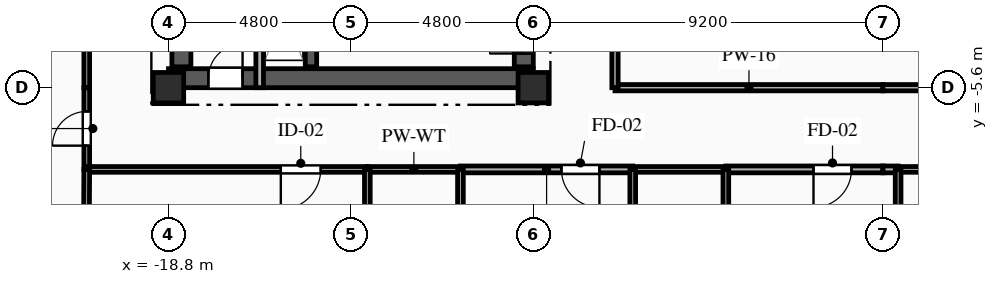
"""IFC4 building model, lengths in metres.
Left out: names, types, materials, properties, quantities, classifications, styles, units other than length and angle.
Written with IfcOpenShell. Run it as: python <this file> out.ifc"""

import sys

from ifc_helpers import new_model, si_unit, direction, frame, frame_2d, origin, origin_2d, place, context, subcontext, project, spatial, rectangle, extrude, element, fill, save


model = new_model("IFC4")
c1 = context("Model", 3, precision=1e-05, world=origin(), true_north=direction((0.0, 1.0)))
c2 = subcontext(c1, "Body", "Model", "MODEL_VIEW")
j1 = project(units=[si_unit("LENGTHUNIT", "METRE"), si_unit("PLANEANGLEUNIT", "RADIAN")], contexts=[c1])
p1 = place(None, origin())
s1 = spatial("IfcSite", under=j1, at=p1, CompositionType="ELEMENT")
p2 = place(p1, origin())
s2 = spatial("IfcBuilding", under=s1, at=p2, CompositionType="ELEMENT")
p3 = place(p2, frame((0.0, 0.0, 219.85)))
s3 = spatial("IfcBuildingStorey", under=s2, at=p3, CompositionType="ELEMENT", Elevation=219.85)
for number, where, z_axis, x_axis in (
    (1, (-18.8, -5.6, 0.0), (0.0, 0.0, 1.0), (1.0, 0.0, 0.0)),
    (2, (-9.2, -5.6, 0.0), (0.0, 0.0, 1.0), (1.0, 0.0, 0.0)),
):
    element("IfcColumn", number, at=place(p3, frame(where, z_axis=z_axis, x_axis=x_axis)), inside=s3, PredefinedType="COLUMN", context=c2, shape_type="SweptSolid", body=[
        extrude(rectangle(XDim=0.8, YDim=0.8, at=origin_2d()), origin(), (0.0, 0.0, 1.0), 3.35),
    ])
p4 = place(p3, frame((-18.8, -5.35, 0.0), z_axis=(0.0, 0.0, 1.0), x_axis=(1.0, 0.0, 0.0)))
e3 = element("IfcWall", 3, at=p4, inside=s3, PredefinedType="SHEAR", context=c2, shape_type="SweptSolid", body=[
    extrude(rectangle(XDim=9.6, YDim=0.5, at=frame_2d((4.8, 0.0))), origin(), (0.0, 0.0, 1.0), 3.0),
])
p5 = place(p4, frame((1.05, 0.0, 0.0)))
e4 = element("IfcOpeningElement", 4, at=p5, cuts=e3, PredefinedType="OPENING", context=c2, shape_type="SweptSolid", body=[
    extrude(rectangle(XDim=0.9, YDim=2.1, at=frame_2d((0.45, 1.05))), frame((0.0, 0.26, 0.0), z_axis=(0.0, -1.0, 0.0), x_axis=(1.0, 0.0, 0.0)), (0.0, 0.0, 1.0), 0.52),
])
p6 = place(p3, frame((-18.46, -5.05, 0.0), z_axis=(0.0, 0.0, 1.0), x_axis=(0.0, 1.0, 0.0)))
e5 = element("IfcWall", 5, at=p6, inside=s3, PredefinedType="SHEAR", context=c2, shape_type="SweptSolid", body=[
    extrude(rectangle(XDim=10.1, YDim=0.5, at=frame_2d((5.05, 0.0))), origin(), (0.0, 0.0, 1.0), 3.0),
])
p7 = place(p3, frame((-9.45, -5.05, 0.0), z_axis=(0.0, 0.0, 1.0), x_axis=(0.0, 1.0, 0.0)))
e6 = element("IfcWall", 6, at=p7, inside=s3, PredefinedType="SHEAR", context=c2, shape_type="SweptSolid", body=[
    extrude(rectangle(XDim=10.1, YDim=0.5, at=frame_2d((5.05, 0.0))), origin(), (0.0, 0.0, 1.0), 3.0),
])
p8 = place(p7, frame((7.15, 0.0, 0.0)))
e7 = element("IfcOpeningElement", 7, at=p8, cuts=e6, PredefinedType="OPENING", context=c2, shape_type="SweptSolid", body=[
    extrude(rectangle(XDim=0.9, YDim=2.1, at=frame_2d((0.45, 1.05))), frame((0.0, 0.26, 0.0), z_axis=(0.0, -1.0, 0.0), x_axis=(1.0, 0.0, 0.0)), (0.0, 0.0, 1.0), 0.52),
])
p9 = place(p7, frame((2.4, 0.0, 0.0)))
e8 = element("IfcOpeningElement", 8, at=p9, cuts=e6, PredefinedType="OPENING", context=c2, shape_type="SweptSolid", body=[
    extrude(rectangle(XDim=1.2, YDim=2.15, at=frame_2d((0.6, 1.075))), frame((0.0, 0.26, 0.0), z_axis=(0.0, -1.0, 0.0), x_axis=(1.0, 0.0, 0.0)), (0.0, 0.0, 1.0), 0.52),
])
p10 = place(p7, frame((0.35, 0.0, 0.0)))
e9 = element("IfcOpeningElement", 9, at=p10, cuts=e6, PredefinedType="OPENING", context=c2, shape_type="SweptSolid", body=[
    extrude(rectangle(XDim=0.9, YDim=2.1, at=frame_2d((0.45, 1.05))), frame((0.0, 0.26, 0.0), z_axis=(0.0, -1.0, 0.0), x_axis=(1.0, 0.0, 0.0)), (0.0, 0.0, 1.0), 0.52),
])
p11 = place(p7, frame((5.0, 0.0, 0.0)))
e10 = element("IfcOpeningElement", 10, at=p11, cuts=e6, PredefinedType="OPENING", context=c2, shape_type="SweptSolid", body=[
    extrude(rectangle(XDim=0.9, YDim=2.1, at=frame_2d((0.45, 1.05))), frame((0.0, 0.26, 0.0), z_axis=(0.0, -1.0, 0.0), x_axis=(1.0, 0.0, 0.0)), (0.0, 0.0, 1.0), 0.52),
])
p12 = place(p3, frame((-15.05, -5.05, 0.0), z_axis=(0.0, 0.0, 1.0), x_axis=(0.0, 1.0, 0.0)))
e11 = element("IfcWall", 11, at=p12, inside=s3, PredefinedType="SHEAR", context=c2, shape_type="SweptSolid", body=[
    extrude(rectangle(XDim=10.1, YDim=0.3, at=frame_2d((5.05, 0.0))), origin(), (0.0, 0.0, 1.0), 3.0),
])
p13 = place(p3, frame((-16.4, -5.6, 0.0), z_axis=(0.0, 0.0, 1.0), x_axis=(0.0, 1.0, 0.0)))
e12 = element("IfcWall", 12, at=p13, inside=s3, PredefinedType="PARTITIONING", context=c2, shape_type="SweptSolid", body=[
    extrude(rectangle(XDim=3.49, YDim=0.2, at=frame_2d((1.745, 0.0))), origin(), (0.0, 0.0, 1.0), 3.0),
])
p14 = place(p3, frame((-20.95, -7.75, 0.0), z_axis=(0.0, 0.0, 1.0), x_axis=(0.0, 1.0, 0.0)))
e13 = element("IfcWall", 13, at=p14, inside=s3, PredefinedType="PARTITIONING", context=c2, shape_type="SweptSolid", body=[
    extrude(rectangle(XDim=2.15, YDim=0.15, at=frame_2d((1.075, 0.0))), origin(), (0.0, 0.0, 1.0), 3.0),
])
p15 = place(p14, frame((0.625, 0.0, 0.0)))
e14 = element("IfcOpeningElement", 14, at=p15, cuts=e13, PredefinedType="OPENING", context=c2, shape_type="SweptSolid", body=[
    extrude(rectangle(XDim=0.9, YDim=2.1, at=frame_2d((0.45, 1.05))), frame((0.0, 0.085, 0.0), z_axis=(0.0, -1.0, 0.0), x_axis=(1.0, 0.0, 0.0)), (0.0, 0.0, 1.0), 0.17),
])
p16 = place(p3, frame((-13.567, -7.75, 0.0), z_axis=(0.0, 0.0, 1.0), x_axis=(-1.0, 0.0, 0.0)))
e15 = element("IfcWall", 15, at=p16, inside=s3, PredefinedType="PARTITIONING", context=c2, shape_type="SweptSolid", body=[
    extrude(rectangle(XDim=7.383, YDim=0.15, at=frame_2d((3.691, 0.0))), origin(), (0.0, 0.0, 1.0), 3.0),
])
p17 = place(p16, frame((1.227, 0.0, 0.0)))
e16 = element("IfcOpeningElement", 16, at=p17, cuts=e15, PredefinedType="OPENING", context=c2, shape_type="SweptSolid", body=[
    extrude(rectangle(XDim=1.05, YDim=2.15, at=frame_2d((0.525, 1.075))), frame((0.0, 0.085, 0.0), z_axis=(0.0, -1.0, 0.0), x_axis=(1.0, 0.0, 0.0)), (0.0, 0.0, 1.0), 0.17),
])
p18 = place(p3, frame((-6.583, -7.75, 0.0), z_axis=(0.0, 0.0, 1.0), x_axis=(-1.0, 0.0, 0.0)))
e17 = element("IfcWall", 17, at=p18, inside=s3, PredefinedType="PARTITIONING", context=c2, shape_type="SweptSolid", body=[
    extrude(rectangle(XDim=4.534, YDim=0.18, at=frame_2d((2.267, 0.0))), origin(), (0.0, 0.0, 1.0), 3.0),
])
p19 = place(p18, frame((0.877, 0.0, 0.0)))
e18 = element("IfcOpeningElement", 18, at=p19, cuts=e17, PredefinedType="OPENING", context=c2, shape_type="SweptSolid", body=[
    extrude(rectangle(XDim=1.0, YDim=2.15, at=frame_2d((0.5, 1.075))), frame((0.0, 0.1, 0.0), z_axis=(0.0, -1.0, 0.0), x_axis=(1.0, 0.0, 0.0)), (0.0, 0.0, 1.0), 0.2),
])
p20 = place(p3, frame((-11.117, -7.75, 0.0), z_axis=(0.0, 0.0, 1.0), x_axis=(-1.0, 0.0, 0.0)))
e19 = element("IfcWall", 19, at=p20, inside=s3, PredefinedType="PLUMBINGWALL", context=c2, shape_type="SweptSolid", body=[
    extrude(rectangle(XDim=2.45, YDim=0.15, at=frame_2d((1.225, 0.0))), origin(), (0.0, 0.0, 1.0), 3.0),
])
p21 = place(p3, frame((0.0, -7.75, 0.0), z_axis=(0.0, 0.0, 1.0), x_axis=(-1.0, 0.0, 0.0)))
e20 = element("IfcWall", 20, at=p21, inside=s3, PredefinedType="PARTITIONING", context=c2, shape_type="SweptSolid", body=[
    extrude(rectangle(XDim=4.133, YDim=0.18, at=frame_2d((2.066, 0.0))), origin(), (0.0, 0.0, 1.0), 3.0),
])
p22 = place(p21, frame((0.827, 0.0, 0.0)))
e21 = element("IfcOpeningElement", 21, at=p22, cuts=e20, PredefinedType="OPENING", context=c2, shape_type="SweptSolid", body=[
    extrude(rectangle(XDim=1.0, YDim=2.15, at=frame_2d((0.5, 1.075))), frame((0.0, 0.1, 0.0), z_axis=(0.0, -1.0, 0.0), x_axis=(1.0, 0.0, 0.0)), (0.0, 0.0, 1.0), 0.2),
])
p23 = place(p3, frame((-4.133, -7.75, 0.0), z_axis=(0.0, 0.0, 1.0), x_axis=(-1.0, 0.0, 0.0)))
e22 = element("IfcWall", 22, at=p23, inside=s3, PredefinedType="PLUMBINGWALL", context=c2, shape_type="SweptSolid", body=[
    extrude(rectangle(XDim=2.45, YDim=0.15, at=frame_2d((1.225, 0.0))), origin(), (0.0, 0.0, 1.0), 3.0),
])
p24 = place(p3, frame((-7.05, -5.6, 0.0), z_axis=(0.0, 0.0, 1.0), x_axis=(1.0, 0.0, 0.0)))
e23 = element("IfcWall", 23, at=p24, inside=s3, PredefinedType="PARTITIONING", context=c2, shape_type="SweptSolid", body=[
    extrude(rectangle(XDim=7.05, YDim=0.165, at=frame_2d((3.525, 0.0))), origin(), (0.0, 0.0, 1.0), 2.485),
])
p25 = place(p3, frame((0.4, -7.75, 0.0), z_axis=(0.0, 0.0, 1.0), x_axis=(-1.0, 0.0, 0.0)))
e24 = element("IfcWall", 24, at=p25, inside=s3, PredefinedType="PARTITIONING", context=c2, shape_type="SweptSolid", body=[
    extrude(rectangle(XDim=0.4, YDim=0.18, at=frame_2d((0.2, 0.0))), origin(), (0.0, 0.0, 1.0), 3.0),
])
p26 = place(p3, frame((2.85, -7.75, 0.0), z_axis=(0.0, 0.0, 1.0), x_axis=(-1.0, 0.0, 0.0)))
e25 = element("IfcWall", 25, at=p26, inside=s3, PredefinedType="PLUMBINGWALL", context=c2, shape_type="SweptSolid", body=[
    extrude(rectangle(XDim=2.45, YDim=0.15, at=frame_2d((1.225, 0.0))), origin(), (0.0, 0.0, 1.0), 3.0),
])
p27 = place(p3, frame((0.0, -5.6, 0.0), z_axis=(0.0, 0.0, 1.0), x_axis=(1.0, 0.0, 0.0)))
e26 = element("IfcWall", 26, at=p27, inside=s3, PredefinedType="PARTITIONING", context=c2, shape_type="SweptSolid", body=[
    extrude(rectangle(XDim=7.05, YDim=0.165, at=frame_2d((3.525, 0.0))), origin(), (0.0, 0.0, 1.0), 2.485),
])
p28 = place(p3, frame((-20.95, -5.6, 0.0), z_axis=(0.0, 0.0, 1.0), x_axis=(0.0, 1.0, 0.0)))
e27 = element("IfcWall", 27, at=p28, inside=s3, PredefinedType="PARTITIONING", context=c2, shape_type="SweptSolid", body=[
    extrude(rectangle(XDim=2.144, YDim=0.15, at=frame_2d((1.072, 0.0))), origin(), (0.0, 0.0, 1.0), 3.0),
])
p29 = place(p3, frame((-7.05, -2.95, 0.0), z_axis=(0.0, 0.0, 1.0), x_axis=(0.0, -1.0, 0.0)))
e28 = element("IfcWall", 28, at=p29, inside=s3, PredefinedType="PARTITIONING", context=c2, shape_type="SweptSolid", body=[
    extrude(rectangle(XDim=2.65, YDim=0.165, at=frame_2d((1.325, 0.0))), origin(), (0.0, 0.0, 1.0), 3.0),
])
p30 = place(p3, frame((-20.95, -7.75, 0.0), z_axis=(0.0, 0.0, 1.0), x_axis=(-0.005804668564, -0.99998315277, 0.0)))
e29 = element("IfcWall", 29, at=p30, inside=s3, PredefinedType="PARTITIONING", context=c2, shape_type="SweptSolid", body=[
    extrude(rectangle(XDim=7.571, YDim=0.15, at=frame_2d((3.785, 0.0))), origin(), (0.0, 0.0, 1.0), 3.0),
])
for number, where, z_axis, x_axis in (
    (30, (-13.567, -7.75, 0.0), (0.0, 0.0, 1.0), (0.0, -1.0, 0.0)),
    (31, (-11.117, -9.9, 0.0), (0.0, 0.0, 1.0), (0.0, 1.0, 0.0)),
    (32, (-6.583, -7.75, 0.0), (0.0, 0.0, 1.0), (0.0, -1.0, 0.0)),
    (33, (-4.133, -9.9, 0.0), (0.0, 0.0, 1.0), (0.0, 1.0, 0.0)),
    (34, (0.4, -7.75, 0.0), (0.0, 0.0, 1.0), (0.0, -1.0, 0.0)),
):
    element("IfcWall", number, at=place(p3, frame(where, z_axis=z_axis, x_axis=x_axis)), inside=s3, PredefinedType="PLUMBINGWALL", context=c2, shape_type="SweptSolid", body=[
        extrude(rectangle(XDim=2.15, YDim=0.15, at=frame_2d((1.075, 0.0))), origin(), (0.0, 0.0, 1.0), 3.0),
    ])
p31 = place(p5, origin())
e35 = element("IfcDoor", 35, at=p31, inside=s3, OperationType="SINGLE_SWING_RIGHT", PredefinedType="DOOR", context=c2, shape_type="SweptSolid", body=[
    extrude(rectangle(XDim=0.9, YDim=2.1, at=frame_2d((0.45, 1.05))), frame((0.0, 0.025, 0.0), z_axis=(0.0, -1.0, 0.0), x_axis=(1.0, 0.0, 0.0)), (0.0, 0.0, 1.0), 0.05),
])
fill(e4, e35)
p32 = place(p10, origin())
e36 = element("IfcDoor", 36, at=p32, inside=s3, OperationType="SINGLE_SWING_LEFT", PredefinedType="DOOR", context=c2, shape_type="SweptSolid", body=[
    extrude(rectangle(XDim=0.9, YDim=2.1, at=frame_2d((0.45, 1.05))), frame((0.0, 0.025, 0.0), z_axis=(0.0, -1.0, 0.0), x_axis=(1.0, 0.0, 0.0)), (0.0, 0.0, 1.0), 0.05),
])
fill(e9, e36)
p33 = place(p15, origin())
e37 = element("IfcDoor", 37, at=p33, inside=s3, OperationType="SINGLE_SWING_LEFT", PredefinedType="DOOR", context=c2, shape_type="SweptSolid", body=[
    extrude(rectangle(XDim=0.9, YDim=2.1, at=frame_2d((0.45, 1.05))), frame((0.0, 0.025, 0.0), z_axis=(0.0, -1.0, 0.0), x_axis=(1.0, 0.0, 0.0)), (0.0, 0.0, 1.0), 0.05),
])
fill(e14, e37)
p34 = place(p17, origin())
e38 = element("IfcDoor", 38, at=p34, inside=s3, OperationType="SINGLE_SWING_RIGHT", PredefinedType="DOOR", context=c2, shape_type="SweptSolid", body=[
    extrude(rectangle(XDim=1.05, YDim=2.15, at=frame_2d((0.525, 1.075))), frame((0.0, 0.025, 0.0), z_axis=(0.0, -1.0, 0.0), x_axis=(1.0, 0.0, 0.0)), (0.0, 0.0, 1.0), 0.05),
])
fill(e16, e38)
p35 = place(p19, origin())
e39 = element("IfcDoor", 39, at=p35, inside=s3, OperationType="SINGLE_SWING_LEFT", PredefinedType="DOOR", context=c2, shape_type="SweptSolid", body=[
    extrude(rectangle(XDim=1.0, YDim=2.15, at=frame_2d((0.5, 1.075))), frame((0.0, 0.025, 0.0), z_axis=(0.0, -1.0, 0.0), x_axis=(1.0, 0.0, 0.0)), (0.0, 0.0, 1.0), 0.05),
])
fill(e18, e39)
p36 = place(p22, origin())
e40 = element("IfcDoor", 40, at=p36, inside=s3, OperationType="SINGLE_SWING_RIGHT", PredefinedType="DOOR", context=c2, shape_type="SweptSolid", body=[
    extrude(rectangle(XDim=1.0, YDim=2.15, at=frame_2d((0.5, 1.075))), frame((0.0, 0.025, 0.0), z_axis=(0.0, -1.0, 0.0), x_axis=(1.0, 0.0, 0.0)), (0.0, 0.0, 1.0), 0.05),
])
fill(e21, e40)
save(model, sys.argv[1])
